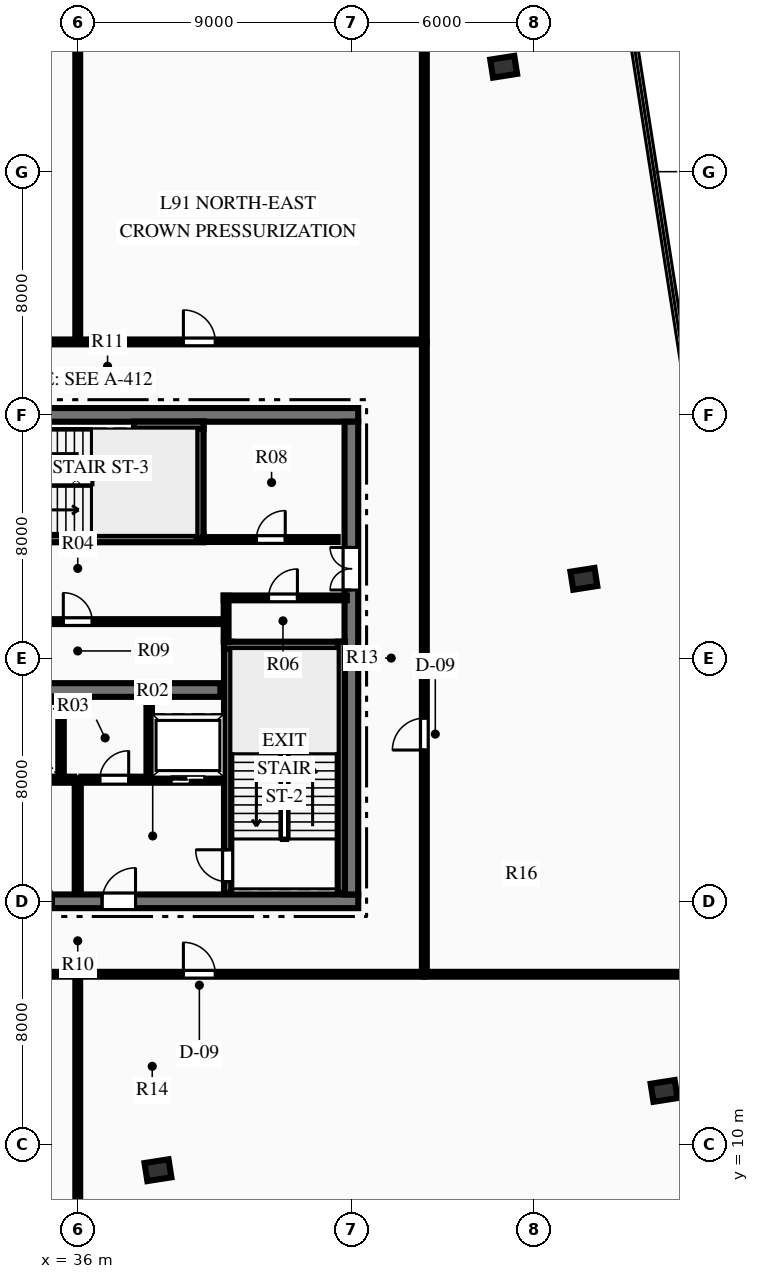
"""IFC4 building model, lengths in metres.
Left out: names, types, materials, properties, quantities, classifications, styles, units other than length and angle.
Written with IfcOpenShell. Run it as: python <this file> out.ifc"""

import sys

from ifc_helpers import new_model, si_unit, direction, frame, frame_2d, origin, origin_2d, place, context, subcontext, project, spatial, rectangle, hollow_rectangle, extrude, element, fill, save


model = new_model("IFC4")
c1 = context("Model", 3, precision=1e-05, world=origin(), true_north=direction((0.0, 1.0)))
c2 = subcontext(c1, "Body", "Model", "MODEL_VIEW")
j1 = project(units=[si_unit("LENGTHUNIT", "METRE"), si_unit("PLANEANGLEUNIT", "RADIAN")], contexts=[c1])
p1 = place(None, origin())
s1 = spatial("IfcSite", under=j1, at=p1, CompositionType="ELEMENT")
p2 = place(p1, origin())
s2 = spatial("IfcBuilding", under=s1, at=p2, CompositionType="ELEMENT")
p3 = place(p2, frame((0.0, 0.0, 360.6)))
s3 = spatial("IfcBuildingStorey", under=s2, at=p3, CompositionType="ELEMENT", Elevation=360.6)
p4 = place(p3, frame((26.775, 18.0, 0.0), z_axis=(0.0, 0.0, 1.0), x_axis=(1.0, 0.0, 0.0)))
e1 = element("IfcWall", 1, at=p4, inside=s3, PredefinedType="SHEAR", context=c2, shape_type="SweptSolid", body=[
    extrude(rectangle(XDim=18.45, YDim=0.45, at=frame_2d((9.225, 0.0))), origin(), (0.0, 0.0, 1.0), 3.6),
])
p5 = place(p4, frame((7.325, 0.0, 0.0)))
e2 = element("IfcOpeningElement", 2, at=p5, cuts=e1, PredefinedType="OPENING", context=c2, shape_type="SweptSolid", body=[
    extrude(rectangle(XDim=1.1, YDim=2.15, at=frame_2d((0.55, 1.075))), frame((0.0, 0.235, 0.0), z_axis=(0.0, -1.0, 0.0), x_axis=(1.0, 0.0, 0.0)), (0.0, 0.0, 1.0), 0.47),
])
p6 = place(p4, frame((10.025, 0.0, 0.0)))
e3 = element("IfcOpeningElement", 3, at=p6, cuts=e1, PredefinedType="OPENING", context=c2, shape_type="SweptSolid", body=[
    extrude(rectangle(XDim=1.1, YDim=2.15, at=frame_2d((0.55, 1.075))), frame((0.0, 0.235, 0.0), z_axis=(0.0, -1.0, 0.0), x_axis=(1.0, 0.0, 0.0)), (0.0, 0.0, 1.0), 0.47),
])
p7 = place(p3, frame((26.775, 34.0, 0.0), z_axis=(0.0, 0.0, 1.0), x_axis=(1.0, 0.0, 0.0)))
e4 = element("IfcWall", 4, at=p7, inside=s3, PredefinedType="SHEAR", context=c2, shape_type="SweptSolid", body=[
    extrude(rectangle(XDim=18.45, YDim=0.45, at=frame_2d((9.225, 0.0))), origin(), (0.0, 0.0, 1.0), 3.6),
])
p8 = place(p3, frame((45.0, 18.225, 0.0), z_axis=(0.0, 0.0, 1.0), x_axis=(0.0, 1.0, 0.0)))
e5 = element("IfcWall", 5, at=p8, inside=s3, PredefinedType="SHEAR", context=c2, shape_type="SweptSolid", body=[
    extrude(rectangle(XDim=15.55, YDim=0.45, at=frame_2d((7.775, 0.0))), origin(), (0.0, 0.0, 1.0), 3.6),
])
p9 = place(p8, frame((10.015, 0.0, 0.0)))
e6 = element("IfcOpeningElement", 6, at=p9, cuts=e5, PredefinedType="OPENING", context=c2, shape_type="SweptSolid", body=[
    extrude(rectangle(XDim=1.4, YDim=2.2, at=frame_2d((0.7, 1.1))), frame((0.0, 0.235, 0.0), z_axis=(0.0, -1.0, 0.0), x_axis=(1.0, 0.0, 0.0)), (0.0, 0.0, 1.0), 0.47),
])
p10 = place(p3, frame((31.31, 24.95, 0.0), z_axis=(0.0, 0.0, 1.0), x_axis=(1.0, 0.0, 0.0)))
e7 = element("IfcWall", 7, at=p10, inside=s3, PredefinedType="SHEAR", context=c2, shape_type="SweptSolid", body=[
    extrude(rectangle(XDim=9.38, YDim=0.45, at=frame_2d((4.69, 0.0))), origin(), (0.0, 0.0, 1.0), 3.6),
])
p11 = place(p3, frame((40.93, 18.28, 0.0), z_axis=(0.0, 0.0, 1.0), x_axis=(0.0, 1.0, 0.0)))
e8 = element("IfcWall", 8, at=p11, inside=s3, PredefinedType="SHEAR", context=c2, shape_type="SweptSolid", body=[
    extrude(rectangle(XDim=8.26, YDim=0.24, at=frame_2d((4.13, 0.0))), origin(), (0.0, 0.0, 1.0), 3.6),
])
p12 = place(p11, frame((0.365, 0.0, 0.0)))
e9 = element("IfcOpeningElement", 9, at=p12, cuts=e8, PredefinedType="OPENING", context=c2, shape_type="SweptSolid", body=[
    extrude(rectangle(XDim=1.05, YDim=2.15, at=frame_2d((0.525, 1.075))), frame((0.0, 0.13, 0.0), z_axis=(0.0, -1.0, 0.0), x_axis=(1.0, 0.0, 0.0)), (0.0, 0.0, 1.0), 0.26),
])
p13 = place(p3, frame((40.81, 26.42, 0.0), z_axis=(0.0, 0.0, 1.0), x_axis=(1.0, 0.0, 0.0)))
e10 = element("IfcWall", 10, at=p13, inside=s3, PredefinedType="SHEAR", context=c2, shape_type="SweptSolid", body=[
    extrude(rectangle(XDim=3.98, YDim=0.24, at=frame_2d((1.99, 0.0))), origin(), (0.0, 0.0, 1.0), 3.6),
])
p14 = place(p3, frame((44.67, 18.28, 0.0), z_axis=(0.0, 0.0, 1.0), x_axis=(0.0, 1.0, 0.0)))
e11 = element("IfcWall", 11, at=p14, inside=s3, PredefinedType="SHEAR", context=c2, shape_type="SweptSolid", body=[
    extrude(rectangle(XDim=8.26, YDim=0.24, at=frame_2d((4.13, 0.0))), origin(), (0.0, 0.0, 1.0), 3.6),
])
p15 = place(p3, frame((31.76, 29.93, 0.0), z_axis=(0.0, 0.0, 1.0), x_axis=(1.0, 0.0, 0.0)))
e12 = element("IfcWall", 12, at=p15, inside=s3, PredefinedType="SHEAR", context=c2, shape_type="SweptSolid", body=[
    extrude(rectangle(XDim=8.38, YDim=0.24, at=frame_2d((4.19, 0.0))), origin(), (0.0, 0.0, 1.0), 3.6),
])
p16 = place(p15, frame((0.565, 0.0, 0.0)))
e13 = element("IfcOpeningElement", 13, at=p16, cuts=e12, PredefinedType="OPENING", context=c2, shape_type="SweptSolid", body=[
    extrude(rectangle(XDim=1.05, YDim=2.15, at=frame_2d((0.525, 1.075))), frame((0.0, 0.13, 0.0), z_axis=(0.0, -1.0, 0.0), x_axis=(1.0, 0.0, 0.0)), (0.0, 0.0, 1.0), 0.26),
])
p17 = place(p3, frame((40.02, 29.93, 0.0), z_axis=(0.0, 0.0, 1.0), x_axis=(0.0, 1.0, 0.0)))
e14 = element("IfcWall", 14, at=p17, inside=s3, PredefinedType="SHEAR", context=c2, shape_type="SweptSolid", body=[
    extrude(rectangle(XDim=3.85, YDim=0.24, at=frame_2d((1.925, 0.0))), origin(), (0.0, 0.0, 1.0), 3.6),
])
p18 = place(p3, frame((37.85, 33.66, 0.0), z_axis=(0.0, 0.0, 1.0), x_axis=(1.0, 0.0, 0.0)))
e15 = element("IfcWall", 15, at=p18, inside=s3, PredefinedType="SHEAR", context=c2, shape_type="SweptSolid", body=[
    extrude(rectangle(XDim=2.29, YDim=0.24, at=frame_2d((1.145, 0.0))), origin(), (0.0, 0.0, 1.0), 3.6),
])
for number, where, z_axis, x_axis in (
    (16, (55.285, 11.762, 0.0), (0.0, 0.0, 1.0), (-0.155, 0.988, 0.0)),
    (17, (52.647, 28.607, 0.0), (0.0, 0.0, 1.0), (-0.155, 0.988, 0.0)),
    (18, (50.009, 45.452, 0.0), (0.0, 0.0, 1.0), (-0.155, 0.988, 0.0)),
    (19, (38.638, 9.155, 0.0), (0.0, 0.0, 1.0), (-0.155, 0.988, 0.0)),
):
    element("IfcColumn", number, at=place(p3, frame(where, z_axis=z_axis, x_axis=x_axis)), inside=s3, PredefinedType="COLUMN", context=c2, shape_type="SweptSolid", body=[
        extrude(hollow_rectangle(XDim=0.6, YDim=0.8, WallThickness=0.04, at=origin_2d()), origin(), (0.0, 0.0, 1.0), 3.6),
    ])
p19 = place(p3, frame((36.0, 18.28, 0.0), z_axis=(0.0, 0.0, 1.0), x_axis=(0.0, 1.0, 0.0)))
e20 = element("IfcWall", 20, at=p19, inside=s3, PredefinedType="PARTITIONING", context=c2, shape_type="SweptSolid", body=[
    extrude(rectangle(XDim=3.77, YDim=0.2, at=frame_2d((1.885, 0.0))), origin(), (0.0, 0.0, 1.0), 3.33),
])
p20 = place(p3, frame((31.19, 22.0, 0.0), z_axis=(0.0, 0.0, 1.0), x_axis=(1.0, 0.0, 0.0)))
e21 = element("IfcWall", 21, at=p20, inside=s3, PredefinedType="PARTITIONING", context=c2, shape_type="SweptSolid", body=[
    extrude(rectangle(XDim=4.69, YDim=0.2, at=frame_2d((2.345, 0.0))), origin(), (0.0, 0.0, 1.0), 3.33),
])
p21 = place(p20, frame((2.91, 0.0, 0.0)))
e22 = element("IfcOpeningElement", 22, at=p21, cuts=e21, PredefinedType="OPENING", context=c2, shape_type="SweptSolid", body=[
    extrude(rectangle(XDim=0.9, YDim=2.15, at=frame_2d((0.45, 1.075))), frame((0.0, 0.11, 0.0), z_axis=(0.0, -1.0, 0.0), x_axis=(1.0, 0.0, 0.0)), (0.0, 0.0, 1.0), 0.22),
])
p22 = place(p20, frame((0.635, 0.0, 0.0)))
e23 = element("IfcOpeningElement", 23, at=p22, cuts=e21, PredefinedType="OPENING", context=c2, shape_type="SweptSolid", body=[
    extrude(rectangle(XDim=1.1, YDim=2.15, at=frame_2d((0.55, 1.075))), frame((0.0, 0.11, 0.0), z_axis=(0.0, -1.0, 0.0), x_axis=(1.0, 0.0, 0.0)), (0.0, 0.0, 1.0), 0.22),
])
p23 = place(p3, frame((36.12, 22.0, 0.0), z_axis=(0.0, 0.0, 1.0), x_axis=(1.0, 0.0, 0.0)))
e24 = element("IfcWall", 24, at=p23, inside=s3, PredefinedType="PARTITIONING", context=c2, shape_type="SweptSolid", body=[
    extrude(rectangle(XDim=4.69, YDim=0.2, at=frame_2d((2.345, 0.0))), origin(), (0.0, 0.0, 1.0), 3.33),
])
p24 = place(p23, frame((0.605, 0.0, 0.0)))
e25 = element("IfcOpeningElement", 25, at=p24, cuts=e24, PredefinedType="OPENING", context=c2, shape_type="SweptSolid", body=[
    extrude(rectangle(XDim=0.95, YDim=2.15, at=frame_2d((0.475, 1.075))), frame((0.0, 0.11, 0.0), z_axis=(0.0, -1.0, 0.0), x_axis=(1.0, 0.0, 0.0)), (0.0, 0.0, 1.0), 0.22),
])
p25 = place(p23, frame((2.955, 0.0, 0.0)))
e26 = element("IfcOpeningElement", 26, at=p25, cuts=e24, PredefinedType="OPENING", context=c2, shape_type="SweptSolid", body=[
    extrude(rectangle(XDim=1.1, YDim=2.15, at=frame_2d((0.55, 1.075))), frame((0.0, 0.11, 0.0), z_axis=(0.0, -1.0, 0.0), x_axis=(1.0, 0.0, 0.0)), (0.0, 0.0, 1.0), 0.22),
])
p26 = place(p3, frame((35.45, 22.05, 0.0), z_axis=(0.0, 0.0, 1.0), x_axis=(0.0, 1.0, 0.0)))
e27 = element("IfcWall", 27, at=p26, inside=s3, PredefinedType="PARTITIONING", context=c2, shape_type="SweptSolid", body=[
    extrude(rectangle(XDim=2.6, YDim=0.18, at=frame_2d((1.3, 0.0))), origin(), (0.0, 0.0, 1.0), 3.33),
])
p27 = place(p3, frame((33.65, 24.65, 0.0), z_axis=(0.0, 0.0, 1.0), x_axis=(1.0, 0.0, 0.0)))
e28 = element("IfcWall", 28, at=p27, inside=s3, PredefinedType="PARTITIONING", context=c2, shape_type="SweptSolid", body=[
    extrude(rectangle(XDim=1.8, YDim=0.18, at=frame_2d((0.9, 0.0))), origin(), (0.0, 0.0, 1.0), 3.33),
])
p28 = place(p3, frame((38.35, 22.05, 0.0), z_axis=(0.0, 0.0, 1.0), x_axis=(0.0, 1.0, 0.0)))
e29 = element("IfcWall", 29, at=p28, inside=s3, PredefinedType="PARTITIONING", context=c2, shape_type="SweptSolid", body=[
    extrude(rectangle(XDim=2.6, YDim=0.18, at=frame_2d((1.3, 0.0))), origin(), (0.0, 0.0, 1.0), 3.33),
])
p29 = place(p3, frame((40.8, 27.98, 0.0), z_axis=(0.0, 0.0, 1.0), x_axis=(1.0, 0.0, 0.0)))
e30 = element("IfcWall", 30, at=p29, inside=s3, PredefinedType="PARTITIONING", context=c2, shape_type="SweptSolid", body=[
    extrude(rectangle(XDim=4.05, YDim=0.16, at=frame_2d((2.025, 0.0))), origin(), (0.0, 0.0, 1.0), 3.33),
])
p30 = place(p29, frame((1.475, 0.0, 0.0)))
e31 = element("IfcOpeningElement", 31, at=p30, cuts=e30, PredefinedType="OPENING", context=c2, shape_type="SweptSolid", body=[
    extrude(rectangle(XDim=0.95, YDim=2.15, at=frame_2d((0.475, 1.075))), frame((0.0, 0.09, 0.0), z_axis=(0.0, -1.0, 0.0), x_axis=(1.0, 0.0, 0.0)), (0.0, 0.0, 1.0), 0.18),
])
p31 = place(p3, frame((40.88, 26.54, 0.0), z_axis=(0.0, 0.0, 1.0), x_axis=(0.0, 1.0, 0.0)))
e32 = element("IfcWall", 32, at=p31, inside=s3, PredefinedType="PARTITIONING", context=c2, shape_type="SweptSolid", body=[
    extrude(rectangle(XDim=1.51, YDim=0.16, at=frame_2d((0.755, 0.0))), origin(), (0.0, 0.0, 1.0), 3.33),
])
p32 = place(p3, frame((40.12, 29.9, 0.0), z_axis=(0.0, 0.0, 1.0), x_axis=(1.0, 0.0, 0.0)))
e33 = element("IfcWall", 33, at=p32, inside=s3, PredefinedType="PARTITIONING", context=c2, shape_type="SweptSolid", body=[
    extrude(rectangle(XDim=4.43, YDim=0.16, at=frame_2d((2.215, 0.0))), origin(), (0.0, 0.0, 1.0), 3.33),
])
p33 = place(p32, frame((1.755, 0.0, 0.0)))
e34 = element("IfcOpeningElement", 34, at=p33, cuts=e33, PredefinedType="OPENING", context=c2, shape_type="SweptSolid", body=[
    extrude(rectangle(XDim=0.95, YDim=2.15, at=frame_2d((0.475, 1.075))), frame((0.0, 0.09, 0.0), z_axis=(0.0, -1.0, 0.0), x_axis=(1.0, 0.0, 0.0)), (0.0, 0.0, 1.0), 0.18),
])
p34 = place(p3, frame((31.2, 27.2, 0.0), z_axis=(0.0, 0.0, 1.0), x_axis=(1.0, 0.0, 0.0)))
e35 = element("IfcWall", 35, at=p34, inside=s3, PredefinedType="PARTITIONING", context=c2, shape_type="SweptSolid", body=[
    extrude(rectangle(XDim=9.6, YDim=0.16, at=frame_2d((4.8, 0.0))), origin(), (0.0, 0.0, 1.0), 3.33),
])
p35 = place(p34, frame((4.325, 0.0, 0.0)))
e36 = element("IfcOpeningElement", 36, at=p35, cuts=e35, PredefinedType="OPENING", context=c2, shape_type="SweptSolid", body=[
    extrude(rectangle(XDim=0.95, YDim=2.15, at=frame_2d((0.475, 1.075))), frame((0.0, 0.09, 0.0), z_axis=(0.0, -1.0, 0.0), x_axis=(1.0, 0.0, 0.0)), (0.0, 0.0, 1.0), 0.18),
])
p36 = place(p3, frame((24.6, 15.6, 0.0), z_axis=(0.0, 0.0, 1.0), x_axis=(1.0, 0.0, 0.0)))
e37 = element("IfcWall", 37, at=p36, inside=s3, PredefinedType="PARTITIONING", context=c2, shape_type="SweptSolid", body=[
    extrude(rectangle(XDim=22.8, YDim=0.16, at=frame_2d((11.4, 0.0))), origin(), (0.0, 0.0, 1.0), 3.33),
])
p37 = place(p36, frame((6.875, 0.0, 0.0)))
e38 = element("IfcOpeningElement", 38, at=p37, cuts=e37, PredefinedType="OPENING", context=c2, shape_type="SweptSolid", body=[
    extrude(rectangle(XDim=1.05, YDim=2.15, at=frame_2d((0.525, 1.075))), frame((0.0, 0.09, 0.0), z_axis=(0.0, -1.0, 0.0), x_axis=(1.0, 0.0, 0.0)), (0.0, 0.0, 1.0), 0.18),
])
p38 = place(p36, frame((14.875, 0.0, 0.0)))
e39 = element("IfcOpeningElement", 39, at=p38, cuts=e37, PredefinedType="OPENING", context=c2, shape_type="SweptSolid", body=[
    extrude(rectangle(XDim=1.05, YDim=2.15, at=frame_2d((0.525, 1.075))), frame((0.0, 0.09, 0.0), z_axis=(0.0, -1.0, 0.0), x_axis=(1.0, 0.0, 0.0)), (0.0, 0.0, 1.0), 0.18),
])
p39 = place(p3, frame((24.6, 36.4, 0.0), z_axis=(0.0, 0.0, 1.0), x_axis=(1.0, 0.0, 0.0)))
e40 = element("IfcWall", 40, at=p39, inside=s3, PredefinedType="PARTITIONING", context=c2, shape_type="SweptSolid", body=[
    extrude(rectangle(XDim=22.8, YDim=0.16, at=frame_2d((11.4, 0.0))), origin(), (0.0, 0.0, 1.0), 3.33),
])
p40 = place(p39, frame((6.875, 0.0, 0.0)))
e41 = element("IfcOpeningElement", 41, at=p40, cuts=e40, PredefinedType="OPENING", context=c2, shape_type="SweptSolid", body=[
    extrude(rectangle(XDim=1.05, YDim=2.15, at=frame_2d((0.525, 1.075))), frame((0.0, 0.09, 0.0), z_axis=(0.0, -1.0, 0.0), x_axis=(1.0, 0.0, 0.0)), (0.0, 0.0, 1.0), 0.18),
])
p41 = place(p39, frame((14.875, 0.0, 0.0)))
e42 = element("IfcOpeningElement", 42, at=p41, cuts=e40, PredefinedType="OPENING", context=c2, shape_type="SweptSolid", body=[
    extrude(rectangle(XDim=1.05, YDim=2.15, at=frame_2d((0.525, 1.075))), frame((0.0, 0.09, 0.0), z_axis=(0.0, -1.0, 0.0), x_axis=(1.0, 0.0, 0.0)), (0.0, 0.0, 1.0), 0.18),
])
p42 = place(p3, frame((47.4, 15.6, 0.0), z_axis=(0.0, 0.0, 1.0), x_axis=(0.0, 1.0, 0.0)))
e43 = element("IfcWall", 43, at=p42, inside=s3, PredefinedType="PARTITIONING", context=c2, shape_type="SweptSolid", body=[
    extrude(rectangle(XDim=20.8, YDim=0.16, at=frame_2d((10.4, 0.0))), origin(), (0.0, 0.0, 1.0), 3.33),
])
p43 = place(p42, frame((7.375, 0.0, 0.0)))
e44 = element("IfcOpeningElement", 44, at=p43, cuts=e43, PredefinedType="OPENING", context=c2, shape_type="SweptSolid", body=[
    extrude(rectangle(XDim=1.05, YDim=2.15, at=frame_2d((0.525, 1.075))), frame((0.0, 0.09, 0.0), z_axis=(0.0, -1.0, 0.0), x_axis=(1.0, 0.0, 0.0)), (0.0, 0.0, 1.0), 0.18),
])
for number, where, z_axis, x_axis in (
    (45, (36.0, 4.38, 0.0), (0.0, 0.0, 1.0), (0.0, 1.0, 0.0)),
    (46, (36.0, 36.4, 0.0), (0.0, 0.0, 1.0), (0.0, 1.0, 0.0)),
):
    element("IfcWall", number, at=place(p3, frame(where, z_axis=z_axis, x_axis=x_axis)), inside=s3, PredefinedType="PARTITIONING", context=c2, shape_type="SweptSolid", body=[
        extrude(rectangle(XDim=11.22, YDim=0.16, at=frame_2d((5.61, 0.0))), origin(), (0.0, 0.0, 1.0), 3.33),
    ])
p44 = place(p3, frame((47.4, 15.6, 0.0), z_axis=(0.0, 0.0, 1.0), x_axis=(1.0, 0.0, 0.0)))
e47 = element("IfcWall", 47, at=p44, inside=s3, PredefinedType="PARTITIONING", context=c2, shape_type="SweptSolid", body=[
    extrude(rectangle(XDim=11.646, YDim=0.16, at=frame_2d((5.823, 0.0))), origin(), (0.0, 0.0, 1.0), 3.33),
])
p45 = place(p3, frame((47.4, 36.4, 0.0), z_axis=(0.0, 0.0, 1.0), x_axis=(0.0, 1.0, 0.0)))
e48 = element("IfcWall", 48, at=p45, inside=s3, PredefinedType="PARTITIONING", context=c2, shape_type="SweptSolid", body=[
    extrude(rectangle(XDim=13.006, YDim=0.16, at=frame_2d((6.503, 0.0))), origin(), (0.0, 0.0, 1.0), 3.33),
])
p46 = place(p24, origin())
e49 = element("IfcDoor", 49, at=p46, inside=s3, OperationType="SINGLE_SWING_RIGHT", PredefinedType="DOOR", context=c2, shape_type="SweptSolid", body=[
    extrude(rectangle(XDim=0.95, YDim=2.15, at=frame_2d((0.475, 1.075))), frame((0.0, 0.025, 0.0), z_axis=(0.0, -1.0, 0.0), x_axis=(1.0, 0.0, 0.0)), (0.0, 0.0, 1.0), 0.05),
])
fill(e25, e49)
p47 = place(p30, origin())
e50 = element("IfcDoor", 50, at=p47, inside=s3, OperationType="SINGLE_SWING_RIGHT", PredefinedType="DOOR", context=c2, shape_type="SweptSolid", body=[
    extrude(rectangle(XDim=0.95, YDim=2.15, at=frame_2d((0.475, 1.075))), frame((0.0, 0.025, 0.0), z_axis=(0.0, -1.0, 0.0), x_axis=(1.0, 0.0, 0.0)), (0.0, 0.0, 1.0), 0.05),
])
fill(e31, e50)
p48 = place(p33, origin())
e51 = element("IfcDoor", 51, at=p48, inside=s3, OperationType="SINGLE_SWING_RIGHT", PredefinedType="DOOR", context=c2, shape_type="SweptSolid", body=[
    extrude(rectangle(XDim=0.95, YDim=2.15, at=frame_2d((0.475, 1.075))), frame((0.0, 0.025, 0.0), z_axis=(0.0, -1.0, 0.0), x_axis=(1.0, 0.0, 0.0)), (0.0, 0.0, 1.0), 0.05),
])
fill(e34, e51)
p49 = place(p35, origin())
e52 = element("IfcDoor", 52, at=p49, inside=s3, OperationType="SINGLE_SWING_LEFT", PredefinedType="DOOR", context=c2, shape_type="SweptSolid", body=[
    extrude(rectangle(XDim=0.95, YDim=2.15, at=frame_2d((0.475, 1.075))), frame((0.0, 0.025, 0.0), z_axis=(0.0, -1.0, 0.0), x_axis=(1.0, 0.0, 0.0)), (0.0, 0.0, 1.0), 0.05),
])
fill(e36, e52)
p50 = place(p12, origin())
e53 = element("IfcDoor", 53, at=p50, inside=s3, OperationType="SINGLE_SWING_RIGHT", PredefinedType="DOOR", context=c2, shape_type="SweptSolid", body=[
    extrude(rectangle(XDim=1.05, YDim=2.15, at=frame_2d((0.525, 1.075))), frame((0.0, 0.025, 0.0), z_axis=(0.0, -1.0, 0.0), x_axis=(1.0, 0.0, 0.0)), (0.0, 0.0, 1.0), 0.05),
])
fill(e9, e53)
p51 = place(p5, origin())
e54 = element("IfcDoor", 54, at=p51, inside=s3, OperationType="SINGLE_SWING_LEFT", PredefinedType="DOOR", context=c2, shape_type="SweptSolid", body=[
    extrude(rectangle(XDim=1.1, YDim=2.15, at=frame_2d((0.55, 1.075))), frame((0.0, 0.025, 0.0), z_axis=(0.0, -1.0, 0.0), x_axis=(1.0, 0.0, 0.0)), (0.0, 0.0, 1.0), 0.05),
])
fill(e2, e54)
p52 = place(p6, origin())
e55 = element("IfcDoor", 55, at=p52, inside=s3, OperationType="SINGLE_SWING_RIGHT", PredefinedType="DOOR", context=c2, shape_type="SweptSolid", body=[
    extrude(rectangle(XDim=1.1, YDim=2.15, at=frame_2d((0.55, 1.075))), frame((0.0, 0.025, 0.0), z_axis=(0.0, -1.0, 0.0), x_axis=(1.0, 0.0, 0.0)), (0.0, 0.0, 1.0), 0.05),
])
fill(e3, e55)
p53 = place(p9, origin())
e56 = element("IfcDoor", 56, at=p53, inside=s3, OperationType="DOUBLE_DOOR_SINGLE_SWING", PredefinedType="DOOR", context=c2, shape_type="SweptSolid", body=[
    extrude(rectangle(XDim=1.4, YDim=2.2, at=frame_2d((0.7, 1.1))), frame((0.0, 0.025, 0.0), z_axis=(0.0, -1.0, 0.0), x_axis=(1.0, 0.0, 0.0)), (0.0, 0.0, 1.0), 0.05),
])
fill(e6, e56)
p54 = place(p38, origin())
e57 = element("IfcDoor", 57, at=p54, inside=s3, OperationType="SINGLE_SWING_LEFT", PredefinedType="DOOR", context=c2, shape_type="SweptSolid", body=[
    extrude(rectangle(XDim=1.05, YDim=2.15, at=frame_2d((0.525, 1.075))), frame((0.0, 0.025, 0.0), z_axis=(0.0, -1.0, 0.0), x_axis=(1.0, 0.0, 0.0)), (0.0, 0.0, 1.0), 0.05),
])
fill(e39, e57)
p55 = place(p43, origin())
e58 = element("IfcDoor", 58, at=p55, inside=s3, OperationType="SINGLE_SWING_LEFT", PredefinedType="DOOR", context=c2, shape_type="SweptSolid", body=[
    extrude(rectangle(XDim=1.05, YDim=2.15, at=frame_2d((0.525, 1.075))), frame((0.0, 0.025, 0.0), z_axis=(0.0, -1.0, 0.0), x_axis=(1.0, 0.0, 0.0)), (0.0, 0.0, 1.0), 0.05),
])
fill(e44, e58)
p56 = place(p41, origin())
e59 = element("IfcDoor", 59, at=p56, inside=s3, OperationType="SINGLE_SWING_LEFT", PredefinedType="DOOR", context=c2, shape_type="SweptSolid", body=[
    extrude(rectangle(XDim=1.05, YDim=2.15, at=frame_2d((0.525, 1.075))), frame((0.0, 0.025, 0.0), z_axis=(0.0, -1.0, 0.0), x_axis=(1.0, 0.0, 0.0)), (0.0, 0.0, 1.0), 0.05),
])
fill(e42, e59)
p57 = place(p25, origin())
e60 = element("IfcDoor", 60, at=p57, inside=s3, OperationType="SLIDING_TO_LEFT", PredefinedType="DOOR", context=c2, shape_type="SweptSolid", body=[
    extrude(rectangle(XDim=1.1, YDim=2.15, at=frame_2d((0.55, 1.075))), frame((0.0, 0.025, 0.0), z_axis=(0.0, -1.0, 0.0), x_axis=(1.0, 0.0, 0.0)), (0.0, 0.0, 1.0), 0.05),
])
fill(e26, e60)
save(model, sys.argv[1])
